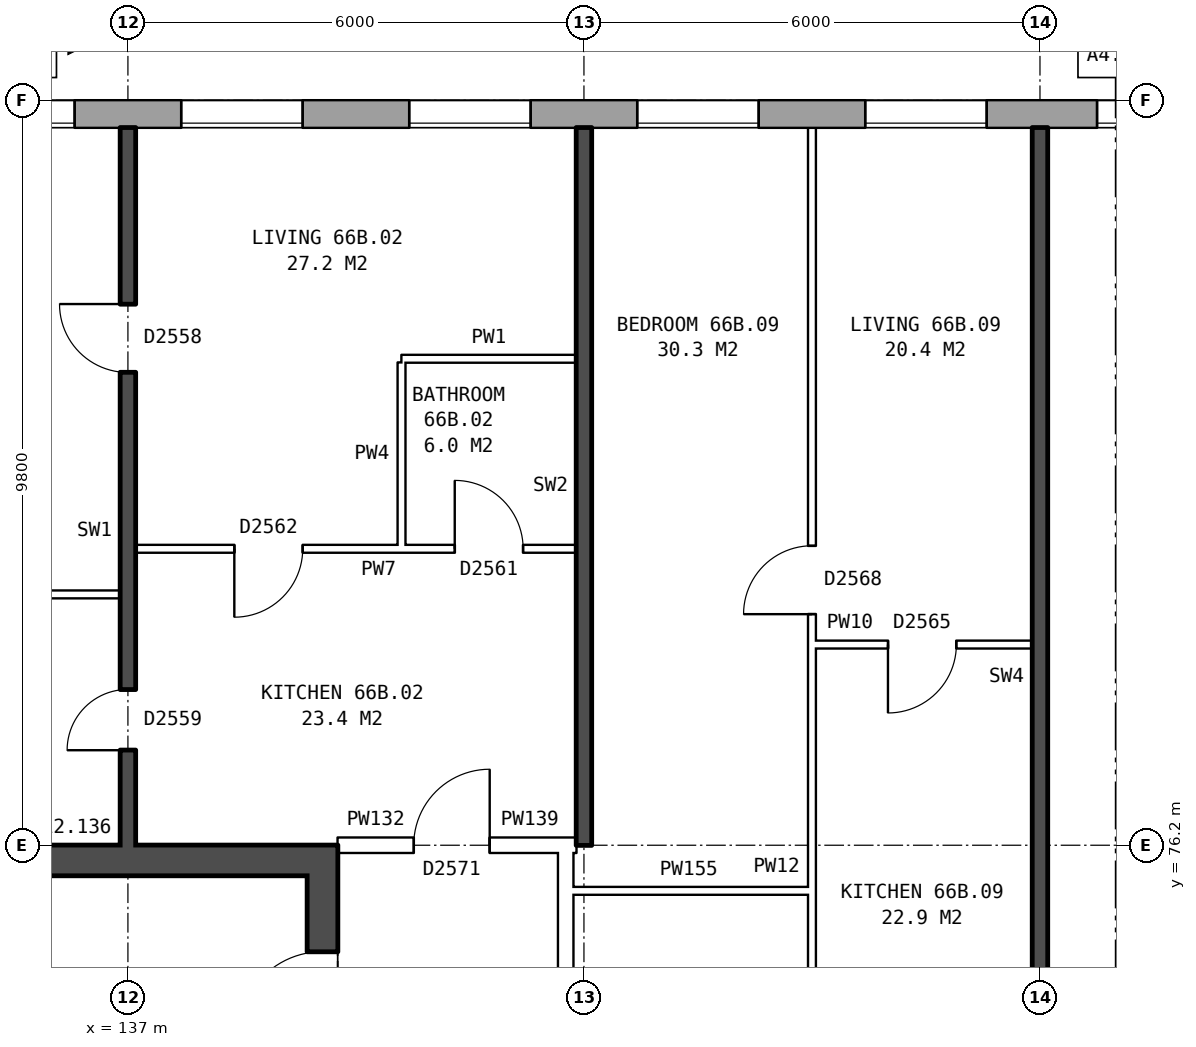
"""IFC4 building model, lengths in metres.
Left out: names, types, materials, properties, quantities, classifications, styles, units other than length and angle.
Written with IfcOpenShell. Run it as: python <this file> out.ifc"""

import sys

from ifc_helpers import new_model, si_unit, direction, frame, frame_2d, origin, place, context, subcontext, project, spatial, rectangle, extrude, element, fill, save


model = new_model("IFC4")
c1 = context("Model", 3, precision=1e-05, world=origin(), true_north=direction((0.0, 1.0)))
c2 = subcontext(c1, "Body", "Model", "MODEL_VIEW")
j1 = project(units=[si_unit("LENGTHUNIT", "METRE"), si_unit("PLANEANGLEUNIT", "RADIAN")], contexts=[c1])
p1 = place(None, origin())
s1 = spatial("IfcSite", under=j1, at=p1, CompositionType="ELEMENT")
p2 = place(p1, origin())
s2 = spatial("IfcBuilding", under=s1, at=p2, CompositionType="ELEMENT")
p3 = place(p2, frame((0.0, 0.0, 233.8)))
s3 = spatial("IfcBuildingStorey", under=s2, at=p3, CompositionType="ELEMENT", Elevation=233.8)
p4 = place(p3, frame((165.925, 85.82, 0.0), z_axis=(0.0, 0.0, 1.0), x_axis=(-1.0, 0.0, 0.0)))
e1 = element("IfcWall", 1, at=p4, inside=s3, PredefinedType="STANDARD", context=c2, shape_type="SweptSolid", body=[
    extrude(rectangle(XDim=33.875, YDim=0.36, at=frame_2d((16.938, 0.0))), origin(), (0.0, 0.0, 1.0), 2.85),
])
p5 = place(p4, frame((2.625, 0.0, 0.8)))
e2 = element("IfcOpeningElement", 2, at=p5, cuts=e1, PredefinedType="OPENING", context=c2, shape_type="SweptSolid", body=[
    extrude(rectangle(XDim=1.6, YDim=1.8, at=frame_2d((0.8, 0.9))), frame((0.0, 0.19, 0.0), z_axis=(0.0, -1.0, 0.0), x_axis=(1.0, 0.0, 0.0)), (0.0, 0.0, 1.0), 0.38),
])
p6 = place(p4, frame((5.625, 0.0, 0.8)))
e3 = element("IfcOpeningElement", 3, at=p6, cuts=e1, PredefinedType="OPENING", context=c2, shape_type="SweptSolid", body=[
    extrude(rectangle(XDim=1.6, YDim=1.8, at=frame_2d((0.8, 0.9))), frame((0.0, 0.19, 0.0), z_axis=(0.0, -1.0, 0.0), x_axis=(1.0, 0.0, 0.0)), (0.0, 0.0, 1.0), 0.38),
])
p7 = place(p4, frame((8.625, 0.0, 0.8)))
e4 = element("IfcOpeningElement", 4, at=p7, cuts=e1, PredefinedType="OPENING", context=c2, shape_type="SweptSolid", body=[
    extrude(rectangle(XDim=1.6, YDim=1.8, at=frame_2d((0.8, 0.9))), frame((0.0, 0.19, 0.0), z_axis=(0.0, -1.0, 0.0), x_axis=(1.0, 0.0, 0.0)), (0.0, 0.0, 1.0), 0.38),
])
p8 = place(p4, frame((11.625, 0.0, 0.8)))
e5 = element("IfcOpeningElement", 5, at=p8, cuts=e1, PredefinedType="OPENING", context=c2, shape_type="SweptSolid", body=[
    extrude(rectangle(XDim=1.6, YDim=1.8, at=frame_2d((0.8, 0.9))), frame((0.0, 0.19, 0.0), z_axis=(0.0, -1.0, 0.0), x_axis=(1.0, 0.0, 0.0)), (0.0, 0.0, 1.0), 0.38),
])
p9 = place(p4, frame((14.075, 0.0, 1.45)))
e6 = element("IfcOpeningElement", 6, at=p9, cuts=e1, PredefinedType="OPENING", context=c2, shape_type="SweptSolid", body=[
    extrude(rectangle(XDim=0.6, YDim=0.9, at=frame_2d((0.3, 0.45))), frame((0.0, 0.19, 0.0), z_axis=(0.0, -1.0, 0.0), x_axis=(1.0, 0.0, 0.0)), (0.0, 0.0, 1.0), 0.38),
])
p10 = place(p4, frame((17.625, 0.0, 0.8)))
e7 = element("IfcOpeningElement", 7, at=p10, cuts=e1, PredefinedType="OPENING", context=c2, shape_type="SweptSolid", body=[
    extrude(rectangle(XDim=1.6, YDim=1.8, at=frame_2d((0.8, 0.9))), frame((0.0, 0.19, 0.0), z_axis=(0.0, -1.0, 0.0), x_axis=(1.0, 0.0, 0.0)), (0.0, 0.0, 1.0), 0.38),
])
p11 = place(p4, frame((20.625, 0.0, 0.8)))
e8 = element("IfcOpeningElement", 8, at=p11, cuts=e1, PredefinedType="OPENING", context=c2, shape_type="SweptSolid", body=[
    extrude(rectangle(XDim=1.6, YDim=1.8, at=frame_2d((0.8, 0.9))), frame((0.0, 0.19, 0.0), z_axis=(0.0, -1.0, 0.0), x_axis=(1.0, 0.0, 0.0)), (0.0, 0.0, 1.0), 0.38),
])
p12 = place(p4, frame((23.625, 0.0, 0.8)))
e9 = element("IfcOpeningElement", 9, at=p12, cuts=e1, PredefinedType="OPENING", context=c2, shape_type="SweptSolid", body=[
    extrude(rectangle(XDim=1.6, YDim=1.8, at=frame_2d((0.8, 0.9))), frame((0.0, 0.19, 0.0), z_axis=(0.0, -1.0, 0.0), x_axis=(1.0, 0.0, 0.0)), (0.0, 0.0, 1.0), 0.38),
])
p13 = place(p4, frame((26.625, 0.0, 0.8)))
e10 = element("IfcOpeningElement", 10, at=p13, cuts=e1, PredefinedType="OPENING", context=c2, shape_type="SweptSolid", body=[
    extrude(rectangle(XDim=1.6, YDim=1.8, at=frame_2d((0.8, 0.9))), frame((0.0, 0.19, 0.0), z_axis=(0.0, -1.0, 0.0), x_axis=(1.0, 0.0, 0.0)), (0.0, 0.0, 1.0), 0.38),
])
p14 = place(p4, frame((29.625, 0.0, 0.8)))
e11 = element("IfcOpeningElement", 11, at=p14, cuts=e1, PredefinedType="OPENING", context=c2, shape_type="SweptSolid", body=[
    extrude(rectangle(XDim=1.6, YDim=1.8, at=frame_2d((0.8, 0.9))), frame((0.0, 0.19, 0.0), z_axis=(0.0, -1.0, 0.0), x_axis=(1.0, 0.0, 0.0)), (0.0, 0.0, 1.0), 0.38),
])
p15 = place(p4, frame((15.575, 0.0, 0.15)))
e12 = element("IfcOpeningElement", 12, at=p15, cuts=e1, PredefinedType="OPENING", context=c2, shape_type="SweptSolid", body=[
    extrude(rectangle(XDim=0.6, YDim=0.9, at=frame_2d((0.3, 0.45))), frame((0.0, 0.19, 0.0), z_axis=(0.0, -1.0, 0.0), x_axis=(1.0, 0.0, 0.0)), (0.0, 0.0, 1.0), 0.38),
])
p16 = place(p3, frame((139.56, 63.8, 0.0), z_axis=(0.0, 0.0, 1.0), x_axis=(0.0, 1.0, 0.0)))
e13 = element("IfcWall", 13, at=p16, inside=s3, PredefinedType="SHEAR", context=c2, shape_type="SweptSolid", body=[
    extrude(rectangle(XDim=12.4, YDim=0.4, at=frame_2d((6.2, 0.0))), origin(), (0.0, 0.0, 1.0), 2.85),
])
p17 = place(p16, frame((1.325, 0.0, 0.0)))
e14 = element("IfcOpeningElement", 14, at=p17, cuts=e13, PredefinedType="OPENING", context=c2, shape_type="SweptSolid", body=[
    extrude(rectangle(XDim=1.1, YDim=2.1, at=frame_2d((0.55, 1.05))), frame((0.0, 0.21, 0.0), z_axis=(0.0, -1.0, 0.0), x_axis=(1.0, 0.0, 0.0)), (0.0, 0.0, 1.0), 0.42),
])
p18 = place(p16, frame((3.6, 0.0, 0.0)))
e15 = element("IfcOpeningElement", 15, at=p18, cuts=e13, PredefinedType="OPENING", context=c2, shape_type="SweptSolid", body=[
    extrude(rectangle(XDim=1.1, YDim=2.1, at=frame_2d((0.55, 1.05))), frame((0.0, 0.21, 0.0), z_axis=(0.0, -1.0, 0.0), x_axis=(1.0, 0.0, 0.0)), (0.0, 0.0, 1.0), 0.42),
])
p19 = place(p16, frame((5.8, 0.0, 0.0)))
e16 = element("IfcOpeningElement", 16, at=p19, cuts=e13, PredefinedType="OPENING", context=c2, shape_type="SweptSolid", body=[
    extrude(rectangle(XDim=1.1, YDim=2.1, at=frame_2d((0.55, 1.05))), frame((0.0, 0.21, 0.0), z_axis=(0.0, -1.0, 0.0), x_axis=(1.0, 0.0, 0.0)), (0.0, 0.0, 1.0), 0.42),
])
p20 = place(p16, frame((9.9, 0.0, 0.0)))
e17 = element("IfcOpeningElement", 17, at=p20, cuts=e13, PredefinedType="OPENING", context=c2, shape_type="SweptSolid", body=[
    extrude(rectangle(XDim=1.1, YDim=2.1, at=frame_2d((0.55, 1.05))), frame((0.0, 0.21, 0.0), z_axis=(0.0, -1.0, 0.0), x_axis=(1.0, 0.0, 0.0)), (0.0, 0.0, 1.0), 0.42),
])
p21 = place(p16, frame((8.125, 0.0, 0.0)))
e18 = element("IfcOpeningElement", 18, at=p21, cuts=e13, PredefinedType="OPENING", context=c2, shape_type="SweptSolid", body=[
    extrude(rectangle(XDim=0.85, YDim=2.1, at=frame_2d((0.425, 1.05))), frame((0.0, 0.21, 0.0), z_axis=(0.0, -1.0, 0.0), x_axis=(1.0, 0.0, 0.0)), (0.0, 0.0, 1.0), 0.42),
])
p22 = place(p3, frame((139.36, 76.0, 0.0), z_axis=(0.0, 0.0, 1.0), x_axis=(-1.0, 0.0, 0.0)))
e19 = element("IfcWall", 19, at=p22, inside=s3, PredefinedType="SHEAR", context=c2, shape_type="SweptSolid", body=[
    extrude(rectangle(XDim=7.6, YDim=0.4, at=frame_2d((3.8, 0.0))), origin(), (0.0, 0.0, 1.0), 2.85),
])
p23 = place(p3, frame((142.76, 63.9, 0.0), z_axis=(0.0, 0.0, 1.0), x_axis=(0.0, 1.0, 0.0)))
e20 = element("IfcWall", 20, at=p23, inside=s3, PredefinedType="PARTITIONING", context=c2, shape_type="SweptSolid", body=[
    extrude(rectangle(XDim=12.2, YDim=0.2, at=frame_2d((6.1, 0.0))), origin(), (0.0, 0.0, 1.0), 2.85),
])
p24 = place(p23, frame((5.1, 0.0, 0.0)))
e21 = element("IfcOpeningElement", 21, at=p24, cuts=e20, PredefinedType="OPENING", context=c2, shape_type="SweptSolid", body=[
    extrude(rectangle(XDim=2.0, YDim=2.1, at=frame_2d((1.0, 1.05))), frame((0.0, 0.11, 0.0), z_axis=(0.0, -1.0, 0.0), x_axis=(1.0, 0.0, 0.0)), (0.0, 0.0, 1.0), 0.22),
])
p25 = place(p3, frame((142.76, 75.6, 0.0), z_axis=(0.0, 0.0, 1.0), x_axis=(1.0, 0.0, 0.0)))
e22 = element("IfcWall", 22, at=p25, inside=s3, PredefinedType="PARTITIONING", context=c2, shape_type="SweptSolid", body=[
    extrude(rectangle(XDim=3.24, YDim=0.1, at=frame_2d((1.62, 0.0))), origin(), (0.0, 0.0, 1.0), 2.85),
])
p26 = place(p3, frame((139.76, 76.2, 0.0), z_axis=(0.0, 0.0, 1.0), x_axis=(1.0, 0.0, 0.0)))
e23 = element("IfcWall", 23, at=p26, inside=s3, PredefinedType="PARTITIONING", context=c2, shape_type="SweptSolid", body=[
    extrude(rectangle(XDim=3.0, YDim=0.2, at=frame_2d((1.5, 0.0))), origin(), (0.0, 0.0, 1.0), 2.85),
])
p27 = place(p26, frame((1.0, 0.0, 0.0)))
e24 = element("IfcOpeningElement", 24, at=p27, cuts=e23, PredefinedType="OPENING", context=c2, shape_type="SweptSolid", body=[
    extrude(rectangle(XDim=1.0, YDim=2.1, at=frame_2d((0.5, 1.05))), frame((0.0, 0.11, 0.0), z_axis=(0.0, -1.0, 0.0), x_axis=(1.0, 0.0, 0.0)), (0.0, 0.0, 1.0), 0.22),
])
p28 = place(p3, frame((142.76, 76.2, 0.0), z_axis=(0.0, 0.0, 1.0), x_axis=(1.0, 0.0, 0.0)))
e25 = element("IfcWall", 25, at=p28, inside=s3, PredefinedType="PARTITIONING", context=c2, shape_type="SweptSolid", body=[
    extrude(rectangle(XDim=0.14, YDim=0.2, at=frame_2d((0.07, 0.0))), origin(), (0.0, 0.0, 1.0), 2.85),
])
p29 = place(p3, frame((146.0, 78.84, 0.0), z_axis=(0.0, 0.0, 1.0), x_axis=(1.0, 0.0, 0.0)))
e26 = element("IfcWall", 26, at=p29, inside=s3, PredefinedType="PARTITIONING", context=c2, shape_type="SweptSolid", body=[
    extrude(rectangle(XDim=2.9, YDim=0.1, at=frame_2d((1.45, 0.0))), origin(), (0.0, 0.0, 1.0), 2.85),
])
p30 = place(p29, frame((1.0, 0.0, 0.0)))
e27 = element("IfcOpeningElement", 27, at=p30, cuts=e26, PredefinedType="OPENING", context=c2, shape_type="SweptSolid", body=[
    extrude(rectangle(XDim=0.9, YDim=2.1, at=frame_2d((0.45, 1.05))), frame((0.0, 0.06, 0.0), z_axis=(0.0, -1.0, 0.0), x_axis=(1.0, 0.0, 0.0)), (0.0, 0.0, 1.0), 0.12),
])
p31 = place(p3, frame((131.1, 79.5, 0.0), z_axis=(0.0, 0.0, 1.0), x_axis=(1.0, 0.0, 0.0)))
e28 = element("IfcWall", 28, at=p31, inside=s3, PredefinedType="PARTITIONING", context=c2, shape_type="SweptSolid", body=[
    extrude(rectangle(XDim=5.8, YDim=0.1, at=frame_2d((2.9, 0.0))), origin(), (0.0, 0.0, 1.0), 2.85),
])
p32 = place(p3, frame((137.1, 80.1, 0.0), z_axis=(0.0, 0.0, 1.0), x_axis=(1.0, 0.0, 0.0)))
e29 = element("IfcWall", 29, at=p32, inside=s3, PredefinedType="PARTITIONING", context=c2, shape_type="SweptSolid", body=[
    extrude(rectangle(XDim=5.8, YDim=0.1, at=frame_2d((2.9, 0.0))), origin(), (0.0, 0.0, 1.0), 2.85),
])
p33 = place(p32, frame((1.3, 0.0, 0.0)))
e30 = element("IfcOpeningElement", 30, at=p33, cuts=e29, PredefinedType="OPENING", context=c2, shape_type="SweptSolid", body=[
    extrude(rectangle(XDim=0.9, YDim=2.1, at=frame_2d((0.45, 1.05))), frame((0.0, 0.06, 0.0), z_axis=(0.0, -1.0, 0.0), x_axis=(1.0, 0.0, 0.0)), (0.0, 0.0, 1.0), 0.12),
])
p34 = place(p32, frame((4.2, 0.0, 0.0)))
e31 = element("IfcOpeningElement", 31, at=p34, cuts=e29, PredefinedType="OPENING", context=c2, shape_type="SweptSolid", body=[
    extrude(rectangle(XDim=0.9, YDim=2.1, at=frame_2d((0.45, 1.05))), frame((0.0, 0.06, 0.0), z_axis=(0.0, -1.0, 0.0), x_axis=(1.0, 0.0, 0.0)), (0.0, 0.0, 1.0), 0.12),
])
p35 = place(p3, frame((140.6, 82.6, 0.0), z_axis=(0.0, 0.0, 1.0), x_axis=(1.0, 0.0, 0.0)))
e32 = element("IfcWall", 32, at=p35, inside=s3, PredefinedType="PARTITIONING", context=c2, shape_type="SweptSolid", body=[
    extrude(rectangle(XDim=2.3, YDim=0.1, at=frame_2d((1.15, 0.0))), origin(), (0.0, 0.0, 1.0), 2.85),
])
p36 = place(p3, frame((137.0, 76.2, 0.0), z_axis=(0.0, 0.0, 1.0), x_axis=(0.0, 1.0, 0.0)))
e33 = element("IfcWall", 33, at=p36, inside=s3, PredefinedType="SOLIDWALL", context=c2, shape_type="SweptSolid", body=[
    extrude(rectangle(XDim=9.44, YDim=0.2, at=frame_2d((4.72, 0.0))), origin(), (0.0, 0.0, 1.0), 2.85),
])
p37 = place(p36, frame((6.22, 0.0, 0.0)))
e34 = element("IfcOpeningElement", 34, at=p37, cuts=e33, PredefinedType="OPENING", context=c2, shape_type="SweptSolid", body=[
    extrude(rectangle(XDim=0.9, YDim=2.1, at=frame_2d((0.45, 1.05))), frame((0.0, 0.11, 0.0), z_axis=(0.0, -1.0, 0.0), x_axis=(1.0, 0.0, 0.0)), (0.0, 0.0, 1.0), 0.22),
])
p38 = place(p36, frame((1.25, 0.0, 0.0)))
e35 = element("IfcOpeningElement", 35, at=p38, cuts=e33, PredefinedType="OPENING", context=c2, shape_type="SweptSolid", body=[
    extrude(rectangle(XDim=0.8, YDim=2.1, at=frame_2d((0.4, 1.05))), frame((0.0, 0.11, 0.0), z_axis=(0.0, -1.0, 0.0), x_axis=(1.0, 0.0, 0.0)), (0.0, 0.0, 1.0), 0.22),
])
p39 = place(p3, frame((140.6, 80.15, 0.0), z_axis=(0.0, 0.0, 1.0), x_axis=(0.0, 1.0, 0.0)))
e36 = element("IfcWall", 36, at=p39, inside=s3, PredefinedType="PARTITIONING", context=c2, shape_type="SweptSolid", body=[
    extrude(rectangle(XDim=2.4, YDim=0.1, at=frame_2d((1.2, 0.0))), origin(), (0.0, 0.0, 1.0), 2.85),
])
p40 = place(p3, frame((143.0, 76.2, 0.0), z_axis=(0.0, 0.0, 1.0), x_axis=(0.0, 1.0, 0.0)))
e37 = element("IfcWall", 37, at=p40, inside=s3, PredefinedType="SOLIDWALL", context=c2, shape_type="SweptSolid", body=[
    extrude(rectangle(XDim=9.44, YDim=0.2, at=frame_2d((4.72, 0.0))), origin(), (0.0, 0.0, 1.0), 2.85),
])
p41 = place(p3, frame((146.0, 71.3, 0.0), z_axis=(0.0, 0.0, 1.0), x_axis=(0.0, 1.0, 0.0)))
e38 = element("IfcWall", 38, at=p41, inside=s3, PredefinedType="PARTITIONING", context=c2, shape_type="SweptSolid", body=[
    extrude(rectangle(XDim=14.34, YDim=0.1, at=frame_2d((7.17, 0.0))), origin(), (0.0, 0.0, 1.0), 2.85),
])
p42 = place(p41, frame((7.94, 0.0, 0.0)))
e39 = element("IfcOpeningElement", 39, at=p42, cuts=e38, PredefinedType="OPENING", context=c2, shape_type="SweptSolid", body=[
    extrude(rectangle(XDim=0.9, YDim=2.1, at=frame_2d((0.45, 1.05))), frame((0.0, 0.06, 0.0), z_axis=(0.0, -1.0, 0.0), x_axis=(1.0, 0.0, 0.0)), (0.0, 0.0, 1.0), 0.12),
])
p43 = place(p41, frame((0.4, 0.0, 0.0)))
e40 = element("IfcOpeningElement", 40, at=p43, cuts=e38, PredefinedType="OPENING", context=c2, shape_type="SweptSolid", body=[
    extrude(rectangle(XDim=0.9, YDim=2.1, at=frame_2d((0.45, 1.05))), frame((0.0, 0.06, 0.0), z_axis=(0.0, -1.0, 0.0), x_axis=(1.0, 0.0, 0.0)), (0.0, 0.0, 1.0), 0.12),
])
p44 = place(p3, frame((149.0, 71.2, 0.0), z_axis=(0.0, 0.0, 1.0), x_axis=(0.0, 1.0, 0.0)))
e41 = element("IfcWall", 41, at=p44, inside=s3, PredefinedType="SOLIDWALL", context=c2, shape_type="SweptSolid", body=[
    extrude(rectangle(XDim=14.44, YDim=0.2, at=frame_2d((7.22, 0.0))), origin(), (0.0, 0.0, 1.0), 2.85),
])
p45 = place(p10, origin())
e42 = element("IfcWindow", 42, at=p45, inside=s3, PartitioningType="SINGLE_PANEL", PredefinedType="WINDOW", context=c2, shape_type="SweptSolid", body=[
    extrude(rectangle(XDim=1.6, YDim=1.8, at=frame_2d((0.8, 0.9))), frame((0.0, 0.15, 0.0), z_axis=(0.0, -1.0, 0.0), x_axis=(1.0, 0.0, 0.0)), (0.0, 0.0, 1.0), 0.06),
])
fill(e7, e42)
p46 = place(p11, origin())
e43 = element("IfcWindow", 43, at=p46, inside=s3, PartitioningType="SINGLE_PANEL", PredefinedType="WINDOW", context=c2, shape_type="SweptSolid", body=[
    extrude(rectangle(XDim=1.6, YDim=1.8, at=frame_2d((0.8, 0.9))), frame((0.0, 0.15, 0.0), z_axis=(0.0, -1.0, 0.0), x_axis=(1.0, 0.0, 0.0)), (0.0, 0.0, 1.0), 0.06),
])
fill(e8, e43)
p47 = place(p12, origin())
e44 = element("IfcWindow", 44, at=p47, inside=s3, PartitioningType="SINGLE_PANEL", PredefinedType="WINDOW", context=c2, shape_type="SweptSolid", body=[
    extrude(rectangle(XDim=1.6, YDim=1.8, at=frame_2d((0.8, 0.9))), frame((0.0, 0.15, 0.0), z_axis=(0.0, -1.0, 0.0), x_axis=(1.0, 0.0, 0.0)), (0.0, 0.0, 1.0), 0.06),
])
fill(e9, e44)
p48 = place(p13, origin())
e45 = element("IfcWindow", 45, at=p48, inside=s3, PartitioningType="SINGLE_PANEL", PredefinedType="WINDOW", context=c2, shape_type="SweptSolid", body=[
    extrude(rectangle(XDim=1.6, YDim=1.8, at=frame_2d((0.8, 0.9))), frame((0.0, 0.15, 0.0), z_axis=(0.0, -1.0, 0.0), x_axis=(1.0, 0.0, 0.0)), (0.0, 0.0, 1.0), 0.06),
])
fill(e10, e45)
p49 = place(p14, origin())
e46 = element("IfcWindow", 46, at=p49, inside=s3, PartitioningType="SINGLE_PANEL", PredefinedType="WINDOW", context=c2, shape_type="SweptSolid", body=[
    extrude(rectangle(XDim=1.6, YDim=1.8, at=frame_2d((0.8, 0.9))), frame((0.0, 0.15, 0.0), z_axis=(0.0, -1.0, 0.0), x_axis=(1.0, 0.0, 0.0)), (0.0, 0.0, 1.0), 0.06),
])
fill(e11, e46)
p50 = place(p20, origin())
e47 = element("IfcDoor", 47, at=p50, inside=s3, OperationType="SINGLE_SWING_LEFT", PredefinedType="DOOR", context=c2, shape_type="SweptSolid", body=[
    extrude(rectangle(XDim=1.1, YDim=2.1, at=frame_2d((0.55, 1.05))), frame((0.0, 0.185, 0.0), z_axis=(0.0, -1.0, 0.0), x_axis=(1.0, 0.0, 0.0)), (0.0, 0.0, 1.0), 0.05),
])
fill(e17, e47)
p51 = place(p37, origin())
e48 = element("IfcDoor", 48, at=p51, inside=s3, OperationType="SINGLE_SWING_RIGHT", PredefinedType="DOOR", context=c2, shape_type="SweptSolid", body=[
    extrude(rectangle(XDim=0.9, YDim=2.1, at=frame_2d((0.45, 1.05))), frame((0.0, 0.025, 0.0), z_axis=(0.0, -1.0, 0.0), x_axis=(1.0, 0.0, 0.0)), (0.0, 0.0, 1.0), 0.05),
])
fill(e34, e48)
p52 = place(p27, origin())
e49 = element("IfcDoor", 49, at=p52, inside=s3, OperationType="SINGLE_SWING_RIGHT", PredefinedType="DOOR", context=c2, shape_type="SweptSolid", body=[
    extrude(rectangle(XDim=1.0, YDim=2.1, at=frame_2d((0.5, 1.05))), frame((0.0, 0.025, 0.0), z_axis=(0.0, -1.0, 0.0), x_axis=(1.0, 0.0, 0.0)), (0.0, 0.0, 1.0), 0.05),
])
fill(e24, e49)
p53 = place(p33, frame((0.9, 0.0, 0.0), z_axis=(0.0, 0.0, 1.0), x_axis=(-1.0, 0.0, 0.0)))
e50 = element("IfcDoor", 50, at=p53, inside=s3, OperationType="SINGLE_SWING_RIGHT", PredefinedType="DOOR", context=c2, shape_type="SweptSolid", body=[
    extrude(rectangle(XDim=0.9, YDim=2.1, at=frame_2d((0.45, 1.05))), frame((0.0, 0.025, 0.0), z_axis=(0.0, -1.0, 0.0), x_axis=(1.0, 0.0, 0.0)), (0.0, 0.0, 1.0), 0.05),
])
fill(e30, e50)
p54 = place(p38, origin())
e51 = element("IfcDoor", 51, at=p54, inside=s3, OperationType="SINGLE_SWING_LEFT", PredefinedType="DOOR", context=c2, shape_type="SweptSolid", body=[
    extrude(rectangle(XDim=0.8, YDim=2.1, at=frame_2d((0.4, 1.05))), frame((0.0, 0.025, 0.0), z_axis=(0.0, -1.0, 0.0), x_axis=(1.0, 0.0, 0.0)), (0.0, 0.0, 1.0), 0.05),
])
fill(e35, e51)
p55 = place(p34, origin())
e52 = element("IfcDoor", 52, at=p55, inside=s3, OperationType="SINGLE_SWING_LEFT", PredefinedType="DOOR", context=c2, shape_type="SweptSolid", body=[
    extrude(rectangle(XDim=0.9, YDim=2.1, at=frame_2d((0.45, 1.05))), frame((0.0, 0.025, 0.0), z_axis=(0.0, -1.0, 0.0), x_axis=(1.0, 0.0, 0.0)), (0.0, 0.0, 1.0), 0.05),
])
fill(e31, e52)
p56 = place(p42, origin())
e53 = element("IfcDoor", 53, at=p56, inside=s3, OperationType="SINGLE_SWING_LEFT", PredefinedType="DOOR", context=c2, shape_type="SweptSolid", body=[
    extrude(rectangle(XDim=0.9, YDim=2.1, at=frame_2d((0.45, 1.05))), frame((0.0, 0.025, 0.0), z_axis=(0.0, -1.0, 0.0), x_axis=(1.0, 0.0, 0.0)), (0.0, 0.0, 1.0), 0.05),
])
fill(e39, e53)
p57 = place(p30, frame((0.9, 0.0, 0.0), z_axis=(0.0, 0.0, 1.0), x_axis=(-1.0, 0.0, 0.0)))
e54 = element("IfcDoor", 54, at=p57, inside=s3, OperationType="SINGLE_SWING_RIGHT", PredefinedType="DOOR", context=c2, shape_type="SweptSolid", body=[
    extrude(rectangle(XDim=0.9, YDim=2.1, at=frame_2d((0.45, 1.05))), frame((0.0, 0.025, 0.0), z_axis=(0.0, -1.0, 0.0), x_axis=(1.0, 0.0, 0.0)), (0.0, 0.0, 1.0), 0.05),
])
fill(e27, e54)
p58 = place(p15, origin())
e55 = element("IfcWindow", 55, at=p58, inside=s3, PartitioningType="SINGLE_PANEL", PredefinedType="WINDOW", context=c2, shape_type="SweptSolid", body=[
    extrude(rectangle(XDim=0.6, YDim=0.9, at=frame_2d((0.3, 0.45))), frame((0.0, 0.15, 0.0), z_axis=(0.0, -1.0, 0.0), x_axis=(1.0, 0.0, 0.0)), (0.0, 0.0, 1.0), 0.06),
])
fill(e12, e55)
save(model, sys.argv[1])
